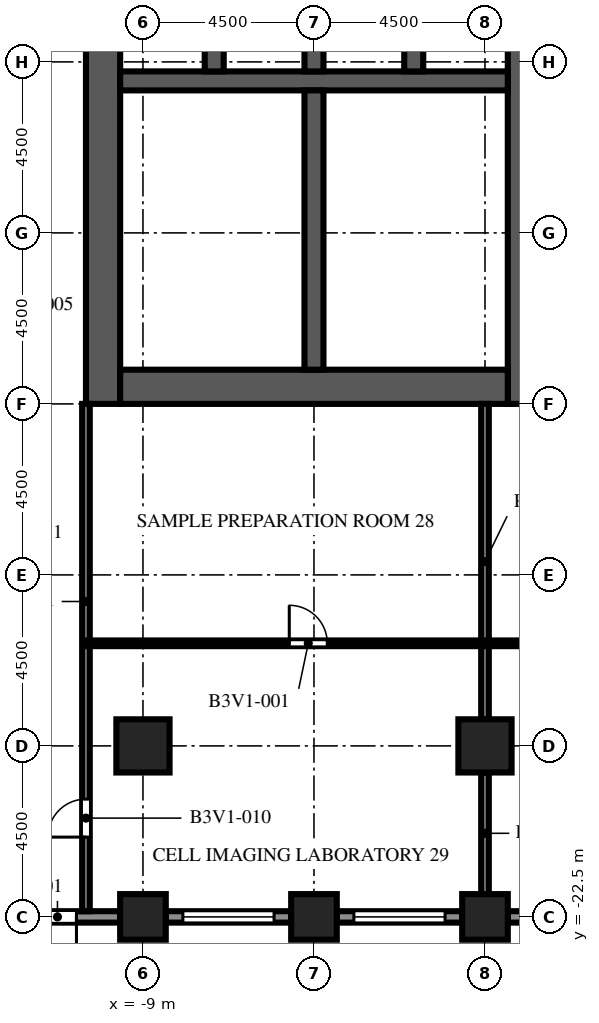
"""IFC4 building model, lengths in metres.
Left out: names, types, materials, properties, quantities, classifications, styles, units other than length and angle.
Written with IfcOpenShell. Run it as: python <this file> out.ifc"""

import sys

from ifc_helpers import new_model, si_unit, direction, frame, frame_2d, origin, origin_2d, place, context, subcontext, project, spatial, rectangle, extrude, element, fill, save


model = new_model("IFC4")
c1 = context("Model", 3, precision=1e-05, world=origin(), true_north=direction((0.0, 1.0)))
c2 = subcontext(c1, "Body", "Model", "MODEL_VIEW")
j1 = project(units=[si_unit("LENGTHUNIT", "METRE"), si_unit("PLANEANGLEUNIT", "RADIAN")], contexts=[c1])
p1 = place(None, origin())
s1 = spatial("IfcSite", under=j1, at=p1, CompositionType="ELEMENT")
p2 = place(p1, origin())
s2 = spatial("IfcBuilding", under=s1, at=p2, CompositionType="ELEMENT")
p3 = place(p2, frame((0.0, 0.0, 86.1)))
s3 = spatial("IfcBuildingStorey", under=s2, at=p3, CompositionType="ELEMENT", Elevation=86.1)
for number, where, z_axis, x_axis in (
    (1, (-9.0, -22.5, 0.0), (0.0, 0.0, 1.0), (1.0, 0.0, 0.0)),
    (2, (-4.5, -22.5, 0.0), (0.0, 0.0, 1.0), (1.0, 0.0, 0.0)),
    (3, (0.0, -22.5, 0.0), (0.0, 0.0, 1.0), (1.0, 0.0, 0.0)),
):
    element("IfcColumn", number, at=place(p3, frame(where, z_axis=z_axis, x_axis=x_axis)), inside=s3, PredefinedType="COLUMN", context=c2, shape_type="SweptSolid", body=[
        extrude(rectangle(XDim=1.2, YDim=1.2, at=origin_2d()), origin(), (0.0, 0.0, 1.0), 4.1),
    ])
for number, where, z_axis, x_axis in (
    (4, (-9.0, -18.0, 0.0), (0.0, 0.0, 1.0), (1.0, 0.0, 0.0)),
    (5, (0.0, -18.0, 0.0), (0.0, 0.0, 1.0), (1.0, 0.0, 0.0)),
):
    element("IfcColumn", number, at=place(p3, frame(where, z_axis=z_axis, x_axis=x_axis)), inside=s3, PredefinedType="COLUMN", context=c2, shape_type="SweptSolid", body=[
        extrude(rectangle(XDim=1.4, YDim=1.4, at=origin_2d()), origin(), (0.0, 0.0, 1.0), 4.1),
    ])
p4 = place(p3, frame((-10.05, -9.0, 0.0), z_axis=(0.0, 0.0, 1.0), x_axis=(0.0, 1.0, 0.0)))
e6 = element("IfcWall", 6, at=p4, inside=s3, PredefinedType="SHEAR", context=c2, shape_type="SweptSolid", body=[
    extrude(rectangle(XDim=27.5, YDim=0.9, at=frame_2d((13.75, 0.0))), origin(), (0.0, 0.0, 1.0), 4.1),
])
p5 = place(p4, frame((12.55, 0.0, 0.0)))
e7 = element("IfcOpeningElement", 7, at=p5, cuts=e6, PredefinedType="OPENING", context=c2, shape_type="SweptSolid", body=[
    extrude(rectangle(XDim=2.4, YDim=2.4, at=frame_2d((1.2, 1.2))), frame((0.0, 0.46, 0.0), z_axis=(0.0, -1.0, 0.0), x_axis=(1.0, 0.0, 0.0)), (0.0, 0.0, 1.0), 0.92),
])
p6 = place(p4, frame((6.825, 0.0, 0.0)))
e8 = element("IfcOpeningElement", 8, at=p6, cuts=e6, PredefinedType="OPENING", context=c2, shape_type="SweptSolid", body=[
    extrude(rectangle(XDim=1.2, YDim=2.1, at=frame_2d((0.6, 1.05))), frame((0.0, 0.46, 0.0), z_axis=(0.0, -1.0, 0.0), x_axis=(1.0, 0.0, 0.0)), (0.0, 0.0, 1.0), 0.92),
])
p7 = place(p4, frame((19.475, 0.0, 0.0)))
e9 = element("IfcOpeningElement", 9, at=p7, cuts=e6, PredefinedType="OPENING", context=c2, shape_type="SweptSolid", body=[
    extrude(rectangle(XDim=1.2, YDim=2.1, at=frame_2d((0.6, 1.05))), frame((0.0, 0.46, 0.0), z_axis=(0.0, -1.0, 0.0), x_axis=(1.0, 0.0, 0.0)), (0.0, 0.0, 1.0), 0.92),
])
p8 = place(p3, frame((1.05, -9.0, 0.0), z_axis=(0.0, 0.0, 1.0), x_axis=(0.0, 1.0, 0.0)))
e10 = element("IfcWall", 10, at=p8, inside=s3, PredefinedType="SHEAR", context=c2, shape_type="SweptSolid", body=[
    extrude(rectangle(XDim=27.5, YDim=0.9, at=frame_2d((13.75, 0.0))), origin(), (0.0, 0.0, 1.0), 4.1),
])
p9 = place(p8, frame((12.55, 0.0, 0.0)))
e11 = element("IfcOpeningElement", 11, at=p9, cuts=e10, PredefinedType="OPENING", context=c2, shape_type="SweptSolid", body=[
    extrude(rectangle(XDim=2.4, YDim=2.4, at=frame_2d((1.2, 1.2))), frame((0.0, 0.46, 0.0), z_axis=(0.0, -1.0, 0.0), x_axis=(1.0, 0.0, 0.0)), (0.0, 0.0, 1.0), 0.92),
])
p10 = place(p8, frame((3.975, 0.0, 0.0)))
e12 = element("IfcOpeningElement", 12, at=p10, cuts=e10, PredefinedType="OPENING", context=c2, shape_type="SweptSolid", body=[
    extrude(rectangle(XDim=1.2, YDim=2.1, at=frame_2d((0.6, 1.05))), frame((0.0, 0.46, 0.0), z_axis=(0.0, -1.0, 0.0), x_axis=(1.0, 0.0, 0.0)), (0.0, 0.0, 1.0), 0.92),
])
p11 = place(p8, frame((22.325, 0.0, 0.0)))
e13 = element("IfcOpeningElement", 13, at=p11, cuts=e10, PredefinedType="OPENING", context=c2, shape_type="SweptSolid", body=[
    extrude(rectangle(XDim=1.2, YDim=2.1, at=frame_2d((0.6, 1.05))), frame((0.0, 0.46, 0.0), z_axis=(0.0, -1.0, 0.0), x_axis=(1.0, 0.0, 0.0)), (0.0, 0.0, 1.0), 0.92),
])
p12 = place(p3, frame((-9.6, -8.55, 0.0), z_axis=(0.0, 0.0, 1.0), x_axis=(1.0, 0.0, 0.0)))
e14 = element("IfcWall", 14, at=p12, inside=s3, PredefinedType="SHEAR", context=c2, shape_type="SweptSolid", body=[
    extrude(rectangle(XDim=10.2, YDim=0.9, at=frame_2d((5.1, 0.0))), origin(), (0.0, 0.0, 1.0), 4.1),
])
p13 = place(p3, frame((-9.6, -0.5, 0.0), z_axis=(0.0, 0.0, 1.0), x_axis=(1.0, 0.0, 0.0)))
e15 = element("IfcWall", 15, at=p13, inside=s3, PredefinedType="SHEAR", context=c2, shape_type="SweptSolid", body=[
    extrude(rectangle(XDim=10.2, YDim=0.5, at=frame_2d((5.1, 0.0))), origin(), (0.0, 0.0, 1.0), 4.1),
])
for number, where, z_axis, x_axis in (
    (16, (-7.125, -0.25, 0.0), (0.0, 0.0, 1.0), (0.0, 1.0, 0.0)),
    (17, (-4.5, -0.25, 0.0), (0.0, 0.0, 1.0), (0.0, 1.0, 0.0)),
    (18, (-1.875, -0.25, 0.0), (0.0, 0.0, 1.0), (0.0, 1.0, 0.0)),
):
    element("IfcWall", number, at=place(p3, frame(where, z_axis=z_axis, x_axis=x_axis)), inside=s3, PredefinedType="SHEAR", context=c2, shape_type="SweptSolid", body=[
        extrude(rectangle(XDim=2.8, YDim=0.5, at=frame_2d((1.4, 0.0))), origin(), (0.0, 0.0, 1.0), 4.1),
    ])
p14 = place(p3, frame((-4.5, -8.1, 0.0), z_axis=(0.0, 0.0, 1.0), x_axis=(0.0, 1.0, 0.0)))
e19 = element("IfcWall", 19, at=p14, inside=s3, PredefinedType="SHEAR", context=c2, shape_type="SweptSolid", body=[
    extrude(rectangle(XDim=7.35, YDim=0.5, at=frame_2d((3.675, 0.0))), origin(), (0.0, 0.0, 1.0), 4.1),
])
p15 = place(p3, frame((-9.6, -22.5, 0.0), z_axis=(0.0, 0.0, 1.0), x_axis=(-1.0, 0.0, 0.0)))
e20 = element("IfcWall", 20, at=p15, inside=s3, PredefinedType="SOLIDWALL", context=c2, shape_type="SweptSolid", body=[
    extrude(rectangle(XDim=3.3, YDim=0.3, at=frame_2d((1.65, 0.0))), origin(), (0.0, 0.0, 1.0), 2.75),
])
p16 = place(p15, frame((1.15, 0.0, 0.0)))
e21 = element("IfcOpeningElement", 21, at=p16, cuts=e20, PredefinedType="OPENING", context=c2, shape_type="SweptSolid", body=[
    extrude(rectangle(XDim=1.0, YDim=2.2, at=frame_2d((0.5, 1.1))), frame((0.0, 0.16, 0.0), z_axis=(0.0, -1.0, 0.0), x_axis=(1.0, 0.0, 0.0)), (0.0, 0.0, 1.0), 0.32),
])
p17 = place(p3, frame((-5.1, -22.5, 0.0), z_axis=(0.0, 0.0, 1.0), x_axis=(-1.0, 0.0, 0.0)))
e22 = element("IfcWall", 22, at=p17, inside=s3, PredefinedType="SOLIDWALL", context=c2, shape_type="SweptSolid", body=[
    extrude(rectangle(XDim=3.3, YDim=0.3, at=frame_2d((1.65, 0.0))), origin(), (0.0, 0.0, 1.0), 2.75),
])
p18 = place(p17, frame((0.45, 0.0, 0.8)))
e23 = element("IfcOpeningElement", 23, at=p18, cuts=e22, PredefinedType="OPENING", context=c2, shape_type="SweptSolid", body=[
    extrude(rectangle(XDim=2.4, YDim=1.7, at=frame_2d((1.2, 0.85))), frame((0.0, 0.16, 0.0), z_axis=(0.0, -1.0, 0.0), x_axis=(1.0, 0.0, 0.0)), (0.0, 0.0, 1.0), 0.32),
])
p19 = place(p3, frame((-0.6, -22.5, 0.0), z_axis=(0.0, 0.0, 1.0), x_axis=(-1.0, 0.0, 0.0)))
e24 = element("IfcWall", 24, at=p19, inside=s3, PredefinedType="SOLIDWALL", context=c2, shape_type="SweptSolid", body=[
    extrude(rectangle(XDim=3.3, YDim=0.3, at=frame_2d((1.65, 0.0))), origin(), (0.0, 0.0, 1.0), 2.75),
])
p20 = place(p19, frame((0.45, 0.0, 0.8)))
e25 = element("IfcOpeningElement", 25, at=p20, cuts=e24, PredefinedType="OPENING", context=c2, shape_type="SweptSolid", body=[
    extrude(rectangle(XDim=2.4, YDim=1.7, at=frame_2d((1.2, 0.85))), frame((0.0, 0.16, 0.0), z_axis=(0.0, -1.0, 0.0), x_axis=(1.0, 0.0, 0.0)), (0.0, 0.0, 1.0), 0.32),
])
p21 = place(p3, frame((3.9, -22.5, 0.0), z_axis=(0.0, 0.0, 1.0), x_axis=(-1.0, 0.0, 0.0)))
e26 = element("IfcWall", 26, at=p21, inside=s3, PredefinedType="SOLIDWALL", context=c2, shape_type="SweptSolid", body=[
    extrude(rectangle(XDim=3.3, YDim=0.3, at=frame_2d((1.65, 0.0))), origin(), (0.0, 0.0, 1.0), 2.75),
])
p22 = place(p21, frame((0.45, 0.0, 0.8)))
e27 = element("IfcOpeningElement", 27, at=p22, cuts=e26, PredefinedType="OPENING", context=c2, shape_type="SweptSolid", body=[
    extrude(rectangle(XDim=2.4, YDim=1.7, at=frame_2d((1.2, 0.85))), frame((0.0, 0.16, 0.0), z_axis=(0.0, -1.0, 0.0), x_axis=(1.0, 0.0, 0.0)), (0.0, 0.0, 1.0), 0.32),
])
p23 = place(p3, frame((-0.9, -8.1, 0.0), z_axis=(0.0, 0.0, 1.0), x_axis=(0.0, 1.0, 0.0)))
e28 = element("IfcWall", 28, at=p23, inside=s3, PredefinedType="PARTITIONING", context=c2, shape_type="SweptSolid", body=[
    extrude(rectangle(XDim=2.499, YDim=0.1, at=frame_2d((1.25, 0.0))), origin(), (0.0, 0.0, 1.0), 3.65),
])
p24 = place(p23, frame((0.75, 0.0, 0.0)))
e29 = element("IfcOpeningElement", 29, at=p24, cuts=e28, PredefinedType="OPENING", context=c2, shape_type="SweptSolid", body=[
    extrude(rectangle(XDim=1.0, YDim=2.1, at=frame_2d((0.5, 1.05))), frame((0.0, 0.06, 0.0), z_axis=(0.0, -1.0, 0.0), x_axis=(1.0, 0.0, 0.0)), (0.0, 0.0, 1.0), 0.12),
])
p25 = place(p3, frame((-0.9, -5.601, 0.0), z_axis=(0.0, 0.0, 1.0), x_axis=(0.0, 1.0, 0.0)))
e30 = element("IfcWall", 30, at=p25, inside=s3, PredefinedType="PARTITIONING", context=c2, shape_type="SweptSolid", body=[
    extrude(rectangle(XDim=2.058, YDim=0.1, at=frame_2d((1.029, 0.0))), origin(), (0.0, 0.0, 1.0), 3.65),
])
p26 = place(p25, frame((0.529, 0.0, 0.0)))
e31 = element("IfcOpeningElement", 31, at=p26, cuts=e30, PredefinedType="OPENING", context=c2, shape_type="SweptSolid", body=[
    extrude(rectangle(XDim=1.0, YDim=2.1, at=frame_2d((0.5, 1.05))), frame((0.0, 0.06, 0.0), z_axis=(0.0, -1.0, 0.0), x_axis=(1.0, 0.0, 0.0)), (0.0, 0.0, 1.0), 0.12),
])
p27 = place(p3, frame((-0.9, -3.543, 0.0), z_axis=(0.0, 0.0, 1.0), x_axis=(0.0, 1.0, 0.0)))
e32 = element("IfcWall", 32, at=p27, inside=s3, PredefinedType="PARTITIONING", context=c2, shape_type="SweptSolid", body=[
    extrude(rectangle(XDim=2.793, YDim=0.1, at=frame_2d((1.396, 0.0))), origin(), (0.0, 0.0, 1.0), 3.65),
])
p28 = place(p27, frame((0.896, 0.0, 0.0)))
e33 = element("IfcOpeningElement", 33, at=p28, cuts=e32, PredefinedType="OPENING", context=c2, shape_type="SweptSolid", body=[
    extrude(rectangle(XDim=1.0, YDim=2.1, at=frame_2d((0.5, 1.05))), frame((0.0, 0.06, 0.0), z_axis=(0.0, -1.0, 0.0), x_axis=(1.0, 0.0, 0.0)), (0.0, 0.0, 1.0), 0.12),
])
for number, where, z_axis, x_axis in (
    (34, (-4.25, -5.601, 0.0), (0.0, 0.0, 1.0), (1.0, 0.0, 0.0)),
    (35, (-4.25, -3.543, 0.0), (0.0, 0.0, 1.0), (1.0, 0.0, 0.0)),
):
    element("IfcWall", number, at=place(p3, frame(where, z_axis=z_axis, x_axis=x_axis)), inside=s3, PredefinedType="PARTITIONING", context=c2, shape_type="SweptSolid", body=[
        extrude(rectangle(XDim=3.35, YDim=0.1, at=frame_2d((1.675, 0.0))), origin(), (0.0, 0.0, 1.0), 3.65),
    ])
p29 = place(p3, frame((-10.5, -9.0, 0.0), z_axis=(0.0, 0.0, 1.0), x_axis=(0.0, -1.0, 0.0)))
e36 = element("IfcWall", 36, at=p29, inside=s3, PredefinedType="PARTITIONING", context=c2, shape_type="SweptSolid", body=[
    extrude(rectangle(XDim=13.35, YDim=0.2, at=frame_2d((6.675, 0.0))), origin(), (0.0, 0.0, 1.0), 3.65),
])
p30 = place(p29, frame((10.4, 0.0, 0.0)))
e37 = element("IfcOpeningElement", 37, at=p30, cuts=e36, PredefinedType="OPENING", context=c2, shape_type="SweptSolid", body=[
    extrude(rectangle(XDim=1.0, YDim=2.1, at=frame_2d((0.5, 1.05))), frame((0.0, 0.11, 0.0), z_axis=(0.0, -1.0, 0.0), x_axis=(1.0, 0.0, 0.0)), (0.0, 0.0, 1.0), 0.22),
])
p31 = place(p3, frame((0.0, -21.9, 0.0), z_axis=(0.0, 0.0, 1.0), x_axis=(0.0, 1.0, 0.0)))
e38 = element("IfcWall", 38, at=p31, inside=s3, PredefinedType="PARTITIONING", context=c2, shape_type="SweptSolid", body=[
    extrude(rectangle(XDim=3.2, YDim=0.2, at=frame_2d((1.6, 0.0))), origin(), (0.0, 0.0, 1.0), 3.65),
])
p32 = place(p3, frame((0.0, -17.3, 0.0), z_axis=(0.0, 0.0, 1.0), x_axis=(0.0, 1.0, 0.0)))
e39 = element("IfcWall", 39, at=p32, inside=s3, PredefinedType="PARTITIONING", context=c2, shape_type="SweptSolid", body=[
    extrude(rectangle(XDim=8.3, YDim=0.2, at=frame_2d((4.15, 0.0))), origin(), (0.0, 0.0, 1.0), 3.65),
])
p33 = place(p3, frame((-10.5, -15.3, 0.0), z_axis=(0.0, 0.0, 1.0), x_axis=(1.0, 0.0, 0.0)))
e40 = element("IfcWall", 40, at=p33, inside=s3, PredefinedType="PARTITIONING", context=c2, shape_type="SweptSolid", body=[
    extrude(rectangle(XDim=28.5, YDim=0.15, at=frame_2d((14.25, 0.0))), origin(), (0.0, 0.0, 1.0), 3.65),
])
p34 = place(p33, frame((5.35, 0.0, 0.0)))
e41 = element("IfcOpeningElement", 41, at=p34, cuts=e40, PredefinedType="OPENING", context=c2, shape_type="SweptSolid", body=[
    extrude(rectangle(XDim=1.0, YDim=2.1, at=frame_2d((0.5, 1.05))), frame((0.0, 0.085, 0.0), z_axis=(0.0, -1.0, 0.0), x_axis=(1.0, 0.0, 0.0)), (0.0, 0.0, 1.0), 0.17),
])
p35 = place(p33, frame((18.1, 0.0, 0.0)))
e42 = element("IfcOpeningElement", 42, at=p35, cuts=e40, PredefinedType="OPENING", context=c2, shape_type="SweptSolid", body=[
    extrude(rectangle(XDim=1.0, YDim=2.1, at=frame_2d((0.5, 1.05))), frame((0.0, 0.085, 0.0), z_axis=(0.0, -1.0, 0.0), x_axis=(1.0, 0.0, 0.0)), (0.0, 0.0, 1.0), 0.17),
])
p36 = place(p33, frame((26.1, 0.0, 0.0)))
e43 = element("IfcOpeningElement", 43, at=p36, cuts=e40, PredefinedType="OPENING", context=c2, shape_type="SweptSolid", body=[
    extrude(rectangle(XDim=1.0, YDim=2.1, at=frame_2d((0.5, 1.05))), frame((0.0, 0.085, 0.0), z_axis=(0.0, -1.0, 0.0), x_axis=(1.0, 0.0, 0.0)), (0.0, 0.0, 1.0), 0.17),
])
p37 = place(p16, origin())
e44 = element("IfcDoor", 44, at=p37, inside=s3, OperationType="SINGLE_SWING_LEFT", PredefinedType="DOOR", context=c2, shape_type="SweptSolid", body=[
    extrude(rectangle(XDim=1.0, YDim=2.2, at=frame_2d((0.5, 1.1))), frame((0.0, 0.025, 0.0), z_axis=(0.0, -1.0, 0.0), x_axis=(1.0, 0.0, 0.0)), (0.0, 0.0, 1.0), 0.05),
])
fill(e21, e44)
p38 = place(p18, origin())
e45 = element("IfcWindow", 45, at=p38, inside=s3, PartitioningType="SINGLE_PANEL", PredefinedType="WINDOW", context=c2, shape_type="SweptSolid", body=[
    extrude(rectangle(XDim=2.4, YDim=1.7, at=frame_2d((1.2, 0.85))), frame((0.0, 0.03, 0.0), z_axis=(0.0, -1.0, 0.0), x_axis=(1.0, 0.0, 0.0)), (0.0, 0.0, 1.0), 0.06),
])
fill(e23, e45)
p39 = place(p20, origin())
e46 = element("IfcWindow", 46, at=p39, inside=s3, PartitioningType="SINGLE_PANEL", PredefinedType="WINDOW", context=c2, shape_type="SweptSolid", body=[
    extrude(rectangle(XDim=2.4, YDim=1.7, at=frame_2d((1.2, 0.85))), frame((0.0, 0.03, 0.0), z_axis=(0.0, -1.0, 0.0), x_axis=(1.0, 0.0, 0.0)), (0.0, 0.0, 1.0), 0.06),
])
fill(e25, e46)
p40 = place(p6, origin())
e47 = element("IfcDoor", 47, at=p40, inside=s3, OperationType="SINGLE_SWING_LEFT", PredefinedType="DOOR", context=c2, shape_type="SweptSolid", body=[
    extrude(rectangle(XDim=1.2, YDim=2.1, at=frame_2d((0.6, 1.05))), frame((0.0, 0.025, 0.0), z_axis=(0.0, -1.0, 0.0), x_axis=(1.0, 0.0, 0.0)), (0.0, 0.0, 1.0), 0.05),
])
fill(e8, e47)
p41 = place(p10, origin())
e48 = element("IfcDoor", 48, at=p41, inside=s3, OperationType="SINGLE_SWING_LEFT", PredefinedType="DOOR", context=c2, shape_type="SweptSolid", body=[
    extrude(rectangle(XDim=1.2, YDim=2.1, at=frame_2d((0.6, 1.05))), frame((0.0, 0.425, 0.0), z_axis=(0.0, -1.0, 0.0), x_axis=(1.0, 0.0, 0.0)), (0.0, 0.0, 1.0), 0.05),
])
fill(e12, e48)
p42 = place(p24, origin())
e49 = element("IfcDoor", 49, at=p42, inside=s3, OperationType="SINGLE_SWING_RIGHT", PredefinedType="DOOR", context=c2, shape_type="SweptSolid", body=[
    extrude(rectangle(XDim=1.0, YDim=2.1, at=frame_2d((0.5, 1.05))), frame((0.0, 0.025, 0.0), z_axis=(0.0, -1.0, 0.0), x_axis=(1.0, 0.0, 0.0)), (0.0, 0.0, 1.0), 0.05),
])
fill(e29, e49)
p43 = place(p26, origin())
e50 = element("IfcDoor", 50, at=p43, inside=s3, OperationType="SINGLE_SWING_LEFT", PredefinedType="DOOR", context=c2, shape_type="SweptSolid", body=[
    extrude(rectangle(XDim=1.0, YDim=2.1, at=frame_2d((0.5, 1.05))), frame((0.0, 0.025, 0.0), z_axis=(0.0, -1.0, 0.0), x_axis=(1.0, 0.0, 0.0)), (0.0, 0.0, 1.0), 0.05),
])
fill(e31, e50)
p44 = place(p28, origin())
e51 = element("IfcDoor", 51, at=p44, inside=s3, OperationType="SINGLE_SWING_RIGHT", PredefinedType="DOOR", context=c2, shape_type="SweptSolid", body=[
    extrude(rectangle(XDim=1.0, YDim=2.1, at=frame_2d((0.5, 1.05))), frame((0.0, 0.025, 0.0), z_axis=(0.0, -1.0, 0.0), x_axis=(1.0, 0.0, 0.0)), (0.0, 0.0, 1.0), 0.05),
])
fill(e33, e51)
p45 = place(p34, origin())
e52 = element("IfcDoor", 52, at=p45, inside=s3, OperationType="SINGLE_SWING_LEFT", PredefinedType="DOOR", context=c2, shape_type="SweptSolid", body=[
    extrude(rectangle(XDim=1.0, YDim=2.1, at=frame_2d((0.5, 1.05))), frame((0.0, 0.025, 0.0), z_axis=(0.0, -1.0, 0.0), x_axis=(1.0, 0.0, 0.0)), (0.0, 0.0, 1.0), 0.05),
])
fill(e41, e52)
p46 = place(p30, origin())
e53 = element("IfcDoor", 53, at=p46, inside=s3, OperationType="SINGLE_SWING_RIGHT", PredefinedType="DOOR", context=c2, shape_type="SweptSolid", body=[
    extrude(rectangle(XDim=1.0, YDim=2.1, at=frame_2d((0.5, 1.05))), frame((0.0, 0.025, 0.0), z_axis=(0.0, -1.0, 0.0), x_axis=(1.0, 0.0, 0.0)), (0.0, 0.0, 1.0), 0.05),
])
fill(e37, e53)
save(model, sys.argv[1])
